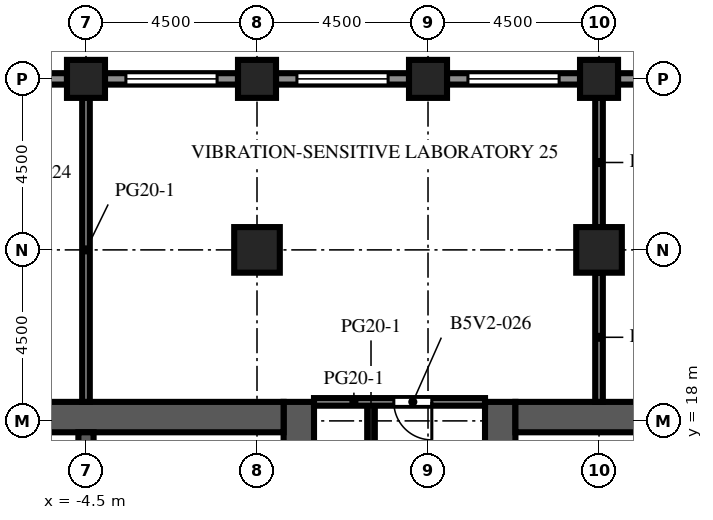
"""IFC4 building model, lengths in metres.
Left out: names, types, materials, properties, quantities, classifications, styles, units other than length and angle.
Written with IfcOpenShell. Run it as: python <this file> out.ifc"""

import sys

from ifc_helpers import new_model, si_unit, direction, frame, frame_2d, origin, origin_2d, place, context, subcontext, project, spatial, rectangle, extrude, element, fill, save


model = new_model("IFC4")
c1 = context("Model", 3, precision=1e-05, world=origin(), true_north=direction((0.0, 1.0)))
c2 = subcontext(c1, "Body", "Model", "MODEL_VIEW")
j1 = project(units=[si_unit("LENGTHUNIT", "METRE"), si_unit("PLANEANGLEUNIT", "RADIAN")], contexts=[c1])
p1 = place(None, origin())
s1 = spatial("IfcSite", under=j1, at=p1, CompositionType="ELEMENT")
p2 = place(p1, origin())
s2 = spatial("IfcBuilding", under=s1, at=p2, CompositionType="ELEMENT")
p3 = place(p2, frame((0.0, 0.0, 177.3)))
s3 = spatial("IfcBuildingStorey", under=s2, at=p3, CompositionType="ELEMENT", Elevation=177.3)
for number, where, z_axis, x_axis in (
    (1, (-4.5, 27.0, 0.0), (0.0, 0.0, 1.0), (1.0, 0.0, 0.0)),
    (2, (0.0, 27.0, 0.0), (0.0, 0.0, 1.0), (1.0, 0.0, 0.0)),
    (3, (4.5, 27.0, 0.0), (0.0, 0.0, 1.0), (1.0, 0.0, 0.0)),
    (4, (9.0, 27.0, 0.0), (0.0, 0.0, 1.0), (1.0, 0.0, 0.0)),
):
    element("IfcColumn", number, at=place(p3, frame(where, z_axis=z_axis, x_axis=x_axis)), inside=s3, PredefinedType="COLUMN", context=c2, shape_type="SweptSolid", body=[
        extrude(rectangle(XDim=1.0, YDim=1.0, at=origin_2d()), origin(), (0.0, 0.0, 1.0), 4.1),
    ])
for number, where, z_axis, x_axis in (
    (5, (0.0, 22.5, 0.0), (0.0, 0.0, 1.0), (1.0, 0.0, 0.0)),
    (6, (9.0, 22.5, 0.0), (0.0, 0.0, 1.0), (1.0, 0.0, 0.0)),
):
    element("IfcColumn", number, at=place(p3, frame(where, z_axis=z_axis, x_axis=x_axis)), inside=s3, PredefinedType="COLUMN", context=c2, shape_type="SweptSolid", body=[
        extrude(rectangle(XDim=1.2, YDim=1.2, at=origin_2d()), origin(), (0.0, 0.0, 1.0), 4.1),
    ])
p4 = place(p3, frame((1.1, -9.0, 0.0), z_axis=(0.0, 0.0, 1.0), x_axis=(0.0, 1.0, 0.0)))
e7 = element("IfcWall", 7, at=p4, inside=s3, PredefinedType="SHEAR", context=c2, shape_type="SweptSolid", body=[
    extrude(rectangle(XDim=27.5, YDim=0.8, at=frame_2d((13.75, 0.0))), origin(), (0.0, 0.0, 1.0), 4.1),
])
p5 = place(p4, frame((12.55, 0.0, 0.0)))
e8 = element("IfcOpeningElement", 8, at=p5, cuts=e7, PredefinedType="OPENING", context=c2, shape_type="SweptSolid", body=[
    extrude(rectangle(XDim=2.4, YDim=2.4, at=frame_2d((1.2, 1.2))), frame((0.0, 0.41, 0.0), z_axis=(0.0, -1.0, 0.0), x_axis=(1.0, 0.0, 0.0)), (0.0, 0.0, 1.0), 0.82),
])
p6 = place(p4, frame((3.85, 0.0, 0.0)))
e9 = element("IfcOpeningElement", 9, at=p6, cuts=e7, PredefinedType="OPENING", context=c2, shape_type="SweptSolid", body=[
    extrude(rectangle(XDim=0.95, YDim=2.1, at=frame_2d((0.475, 1.05))), frame((0.0, 0.41, 0.0), z_axis=(0.0, -1.0, 0.0), x_axis=(1.0, 0.0, 0.0)), (0.0, 0.0, 1.0), 0.82),
])
p7 = place(p4, frame((23.475, 0.0, 0.0)))
e10 = element("IfcOpeningElement", 10, at=p7, cuts=e7, PredefinedType="OPENING", context=c2, shape_type="SweptSolid", body=[
    extrude(rectangle(XDim=1.2, YDim=2.1, at=frame_2d((0.6, 1.05))), frame((0.0, 0.41, 0.0), z_axis=(0.0, -1.0, 0.0), x_axis=(1.0, 0.0, 0.0)), (0.0, 0.0, 1.0), 0.82),
])
p8 = place(p3, frame((-9.7, 18.1, 0.0), z_axis=(0.0, 0.0, 1.0), x_axis=(1.0, 0.0, 0.0)))
e11 = element("IfcWall", 11, at=p8, inside=s3, PredefinedType="SHEAR", context=c2, shape_type="SweptSolid", body=[
    extrude(rectangle(XDim=10.4, YDim=0.8, at=frame_2d((5.2, 0.0))), origin(), (0.0, 0.0, 1.0), 4.1),
])
p9 = place(p3, frame((-4.5, 10.2, 0.0), z_axis=(0.0, 0.0, 1.0), x_axis=(0.0, 1.0, 0.0)))
e12 = element("IfcWall", 12, at=p9, inside=s3, PredefinedType="SHEAR", context=c2, shape_type="SweptSolid", body=[
    extrude(rectangle(XDim=7.5, YDim=0.4, at=frame_2d((3.75, 0.0))), origin(), (0.0, 0.0, 1.0), 4.1),
])
p10 = place(p3, frame((6.4, -9.0, 0.0), z_axis=(0.0, 0.0, 1.0), x_axis=(0.0, 1.0, 0.0)))
e13 = element("IfcWall", 13, at=p10, inside=s3, PredefinedType="SHEAR", context=c2, shape_type="SweptSolid", body=[
    extrude(rectangle(XDim=27.5, YDim=0.8, at=frame_2d((13.75, 0.0))), origin(), (0.0, 0.0, 1.0), 4.1),
])
p11 = place(p10, frame((12.55, 0.0, 0.0)))
e14 = element("IfcOpeningElement", 14, at=p11, cuts=e13, PredefinedType="OPENING", context=c2, shape_type="SweptSolid", body=[
    extrude(rectangle(XDim=2.4, YDim=2.4, at=frame_2d((1.2, 1.2))), frame((0.0, 0.41, 0.0), z_axis=(0.0, -1.0, 0.0), x_axis=(1.0, 0.0, 0.0)), (0.0, 0.0, 1.0), 0.82),
])
p12 = place(p10, frame((3.85, 0.0, 0.0)))
e15 = element("IfcOpeningElement", 15, at=p12, cuts=e13, PredefinedType="OPENING", context=c2, shape_type="SweptSolid", body=[
    extrude(rectangle(XDim=0.95, YDim=2.1, at=frame_2d((0.475, 1.05))), frame((0.0, 0.41, 0.0), z_axis=(0.0, -1.0, 0.0), x_axis=(1.0, 0.0, 0.0)), (0.0, 0.0, 1.0), 0.82),
])
p13 = place(p10, frame((23.475, 0.0, 0.0)))
e16 = element("IfcOpeningElement", 16, at=p13, cuts=e13, PredefinedType="OPENING", context=c2, shape_type="SweptSolid", body=[
    extrude(rectangle(XDim=1.2, YDim=2.1, at=frame_2d((0.6, 1.05))), frame((0.0, 0.41, 0.0), z_axis=(0.0, -1.0, 0.0), x_axis=(1.0, 0.0, 0.0)), (0.0, 0.0, 1.0), 0.82),
])
p14 = place(p3, frame((6.8, 18.1, 0.0), z_axis=(0.0, 0.0, 1.0), x_axis=(1.0, 0.0, 0.0)))
e17 = element("IfcWall", 17, at=p14, inside=s3, PredefinedType="SHEAR", context=c2, shape_type="SweptSolid", body=[
    extrude(rectangle(XDim=10.4, YDim=0.8, at=frame_2d((5.2, 0.0))), origin(), (0.0, 0.0, 1.0), 4.1),
])
p15 = place(p3, frame((9.5, 27.0, 0.0), z_axis=(0.0, 0.0, 1.0), x_axis=(1.0, 0.0, 0.0)))
e18 = element("IfcWall", 18, at=p15, inside=s3, PredefinedType="SOLIDWALL", context=c2, shape_type="SweptSolid", body=[
    extrude(rectangle(XDim=3.5, YDim=0.3, at=frame_2d((1.75, 0.0))), origin(), (0.0, 0.0, 1.0), 2.85),
])
p16 = place(p15, frame((0.55, 0.0, 0.8)))
e19 = element("IfcOpeningElement", 19, at=p16, cuts=e18, PredefinedType="OPENING", context=c2, shape_type="SweptSolid", body=[
    extrude(rectangle(XDim=2.4, YDim=1.7, at=frame_2d((1.2, 0.85))), frame((0.0, 0.16, 0.0), z_axis=(0.0, -1.0, 0.0), x_axis=(1.0, 0.0, 0.0)), (0.0, 0.0, 1.0), 0.32),
])
p17 = place(p3, frame((5.0, 27.0, 0.0), z_axis=(0.0, 0.0, 1.0), x_axis=(1.0, 0.0, 0.0)))
e20 = element("IfcWall", 20, at=p17, inside=s3, PredefinedType="SOLIDWALL", context=c2, shape_type="SweptSolid", body=[
    extrude(rectangle(XDim=3.5, YDim=0.3, at=frame_2d((1.75, 0.0))), origin(), (0.0, 0.0, 1.0), 2.85),
])
p18 = place(p17, frame((0.55, 0.0, 0.8)))
e21 = element("IfcOpeningElement", 21, at=p18, cuts=e20, PredefinedType="OPENING", context=c2, shape_type="SweptSolid", body=[
    extrude(rectangle(XDim=2.4, YDim=1.7, at=frame_2d((1.2, 0.85))), frame((0.0, 0.16, 0.0), z_axis=(0.0, -1.0, 0.0), x_axis=(1.0, 0.0, 0.0)), (0.0, 0.0, 1.0), 0.32),
])
p19 = place(p3, frame((0.5, 27.0, 0.0), z_axis=(0.0, 0.0, 1.0), x_axis=(1.0, 0.0, 0.0)))
e22 = element("IfcWall", 22, at=p19, inside=s3, PredefinedType="SOLIDWALL", context=c2, shape_type="SweptSolid", body=[
    extrude(rectangle(XDim=3.5, YDim=0.3, at=frame_2d((1.75, 0.0))), origin(), (0.0, 0.0, 1.0), 2.85),
])
p20 = place(p19, frame((0.55, 0.0, 0.8)))
e23 = element("IfcOpeningElement", 23, at=p20, cuts=e22, PredefinedType="OPENING", context=c2, shape_type="SweptSolid", body=[
    extrude(rectangle(XDim=2.4, YDim=1.7, at=frame_2d((1.2, 0.85))), frame((0.0, 0.16, 0.0), z_axis=(0.0, -1.0, 0.0), x_axis=(1.0, 0.0, 0.0)), (0.0, 0.0, 1.0), 0.32),
])
p21 = place(p3, frame((-4.0, 27.0, 0.0), z_axis=(0.0, 0.0, 1.0), x_axis=(1.0, 0.0, 0.0)))
e24 = element("IfcWall", 24, at=p21, inside=s3, PredefinedType="SOLIDWALL", context=c2, shape_type="SweptSolid", body=[
    extrude(rectangle(XDim=3.5, YDim=0.3, at=frame_2d((1.75, 0.0))), origin(), (0.0, 0.0, 1.0), 2.85),
])
p22 = place(p21, frame((0.55, 0.0, 0.8)))
e25 = element("IfcOpeningElement", 25, at=p22, cuts=e24, PredefinedType="OPENING", context=c2, shape_type="SweptSolid", body=[
    extrude(rectangle(XDim=2.4, YDim=1.7, at=frame_2d((1.2, 0.85))), frame((0.0, 0.16, 0.0), z_axis=(0.0, -1.0, 0.0), x_axis=(1.0, 0.0, 0.0)), (0.0, 0.0, 1.0), 0.32),
])
p23 = place(p3, frame((-8.5, 27.0, 0.0), z_axis=(0.0, 0.0, 1.0), x_axis=(1.0, 0.0, 0.0)))
e26 = element("IfcWall", 26, at=p23, inside=s3, PredefinedType="SOLIDWALL", context=c2, shape_type="SweptSolid", body=[
    extrude(rectangle(XDim=3.5, YDim=0.3, at=frame_2d((1.75, 0.0))), origin(), (0.0, 0.0, 1.0), 2.85),
])
p24 = place(p23, frame((0.55, 0.0, 0.8)))
e27 = element("IfcOpeningElement", 27, at=p24, cuts=e26, PredefinedType="OPENING", context=c2, shape_type="SweptSolid", body=[
    extrude(rectangle(XDim=2.4, YDim=1.7, at=frame_2d((1.2, 0.85))), frame((0.0, 0.16, 0.0), z_axis=(0.0, -1.0, 0.0), x_axis=(1.0, 0.0, 0.0)), (0.0, 0.0, 1.0), 0.32),
])
p25 = place(p3, frame((-0.6, 15.075, 0.0), z_axis=(0.0, 0.0, 1.0), x_axis=(0.0, 1.0, 0.0)))
e28 = element("IfcWall", 28, at=p25, inside=s3, PredefinedType="PARTITIONING", context=c2, shape_type="SweptSolid", body=[
    extrude(rectangle(XDim=2.625, YDim=0.1, at=frame_2d((1.312, 0.0))), origin(), (0.0, 0.0, 1.0), 3.65),
])
p26 = place(p25, frame((0.812, 0.0, 0.0)))
e29 = element("IfcOpeningElement", 29, at=p26, cuts=e28, PredefinedType="OPENING", context=c2, shape_type="SweptSolid", body=[
    extrude(rectangle(XDim=1.0, YDim=2.1, at=frame_2d((0.5, 1.05))), frame((0.0, 0.06, 0.0), z_axis=(0.0, -1.0, 0.0), x_axis=(1.0, 0.0, 0.0)), (0.0, 0.0, 1.0), 0.12),
])
p27 = place(p3, frame((8.1, 15.075, 0.0), z_axis=(0.0, 0.0, 1.0), x_axis=(0.0, 1.0, 0.0)))
e30 = element("IfcWall", 30, at=p27, inside=s3, PredefinedType="PARTITIONING", context=c2, shape_type="SweptSolid", body=[
    extrude(rectangle(XDim=2.625, YDim=0.1, at=frame_2d((1.312, 0.0))), origin(), (0.0, 0.0, 1.0), 3.65),
])
p28 = place(p27, frame((0.812, 0.0, 0.0)))
e31 = element("IfcOpeningElement", 31, at=p28, cuts=e30, PredefinedType="OPENING", context=c2, shape_type="SweptSolid", body=[
    extrude(rectangle(XDim=1.0, YDim=2.1, at=frame_2d((0.5, 1.05))), frame((0.0, 0.06, 0.0), z_axis=(0.0, -1.0, 0.0), x_axis=(1.0, 0.0, 0.0)), (0.0, 0.0, 1.0), 0.12),
])
p29 = place(p3, frame((-4.5, 18.5, 0.0), z_axis=(0.0, 0.0, 1.0), x_axis=(0.0, 1.0, 0.0)))
e32 = element("IfcWall", 32, at=p29, inside=s3, PredefinedType="PARTITIONING", context=c2, shape_type="SweptSolid", body=[
    extrude(rectangle(XDim=8.0, YDim=0.2, at=frame_2d((4.0, 0.0))), origin(), (0.0, 0.0, 1.0), 3.65),
])
p30 = place(p3, frame((3.0, 6.7, 0.0), z_axis=(0.0, 0.0, 1.0), x_axis=(0.0, 1.0, 0.0)))
e33 = element("IfcWall", 33, at=p30, inside=s3, PredefinedType="PARTITIONING", context=c2, shape_type="SweptSolid", body=[
    extrude(rectangle(XDim=11.8, YDim=0.2, at=frame_2d((5.9, 0.0))), origin(), (0.0, 0.0, 1.0), 3.65),
])
p31 = place(p30, frame((4.35, 0.0, 0.0)))
e34 = element("IfcOpeningElement", 34, at=p31, cuts=e33, PredefinedType="OPENING", context=c2, shape_type="SweptSolid", body=[
    extrude(rectangle(XDim=1.0, YDim=2.1, at=frame_2d((0.5, 1.05))), frame((0.0, 0.11, 0.0), z_axis=(0.0, -1.0, 0.0), x_axis=(1.0, 0.0, 0.0)), (0.0, 0.0, 1.0), 0.22),
])
for number, where, z_axis, x_axis in (
    (35, (9.0, 18.5, 0.0), (0.0, 0.0, 1.0), (0.0, 1.0, 0.0)),
    (36, (9.0, 23.1, 0.0), (0.0, 0.0, 1.0), (0.0, 1.0, 0.0)),
):
    element("IfcWall", number, at=place(p3, frame(where, z_axis=z_axis, x_axis=x_axis)), inside=s3, PredefinedType="PARTITIONING", context=c2, shape_type="SweptSolid", body=[
        extrude(rectangle(XDim=3.4, YDim=0.2, at=frame_2d((1.7, 0.0))), origin(), (0.0, 0.0, 1.0), 3.65),
    ])
p32 = place(p3, frame((1.5, 18.5, 0.0), z_axis=(0.0, 0.0, 1.0), x_axis=(1.0, 0.0, 0.0)))
e37 = element("IfcWall", 37, at=p32, inside=s3, PredefinedType="PARTITIONING", context=c2, shape_type="SweptSolid", body=[
    extrude(rectangle(XDim=4.5, YDim=0.2, at=frame_2d((2.25, 0.0))), origin(), (0.0, 0.0, 1.0), 3.65),
])
p33 = place(p32, frame((2.1, 0.0, 0.0)))
e38 = element("IfcOpeningElement", 38, at=p33, cuts=e37, PredefinedType="OPENING", context=c2, shape_type="SweptSolid", body=[
    extrude(rectangle(XDim=1.0, YDim=2.1, at=frame_2d((0.5, 1.05))), frame((0.0, 0.11, 0.0), z_axis=(0.0, -1.0, 0.0), x_axis=(1.0, 0.0, 0.0)), (0.0, 0.0, 1.0), 0.22),
])
p34 = place(p18, origin())
e39 = element("IfcWindow", 39, at=p34, inside=s3, PartitioningType="SINGLE_PANEL", PredefinedType="WINDOW", context=c2, shape_type="SweptSolid", body=[
    extrude(rectangle(XDim=2.4, YDim=1.7, at=frame_2d((1.2, 0.85))), frame((0.0, 0.03, 0.0), z_axis=(0.0, -1.0, 0.0), x_axis=(1.0, 0.0, 0.0)), (0.0, 0.0, 1.0), 0.06),
])
fill(e21, e39)
p35 = place(p20, origin())
e40 = element("IfcWindow", 40, at=p35, inside=s3, PartitioningType="SINGLE_PANEL", PredefinedType="WINDOW", context=c2, shape_type="SweptSolid", body=[
    extrude(rectangle(XDim=2.4, YDim=1.7, at=frame_2d((1.2, 0.85))), frame((0.0, 0.03, 0.0), z_axis=(0.0, -1.0, 0.0), x_axis=(1.0, 0.0, 0.0)), (0.0, 0.0, 1.0), 0.06),
])
fill(e23, e40)
p36 = place(p22, origin())
e41 = element("IfcWindow", 41, at=p36, inside=s3, PartitioningType="SINGLE_PANEL", PredefinedType="WINDOW", context=c2, shape_type="SweptSolid", body=[
    extrude(rectangle(XDim=2.4, YDim=1.7, at=frame_2d((1.2, 0.85))), frame((0.0, 0.03, 0.0), z_axis=(0.0, -1.0, 0.0), x_axis=(1.0, 0.0, 0.0)), (0.0, 0.0, 1.0), 0.06),
])
fill(e25, e41)
p37 = place(p33, origin())
e42 = element("IfcDoor", 42, at=p37, inside=s3, OperationType="SINGLE_SWING_RIGHT", PredefinedType="DOOR", context=c2, shape_type="SweptSolid", body=[
    extrude(rectangle(XDim=1.0, YDim=2.1, at=frame_2d((0.5, 1.05))), frame((0.0, 0.025, 0.0), z_axis=(0.0, -1.0, 0.0), x_axis=(1.0, 0.0, 0.0)), (0.0, 0.0, 1.0), 0.05),
])
fill(e38, e42)
save(model, sys.argv[1])
